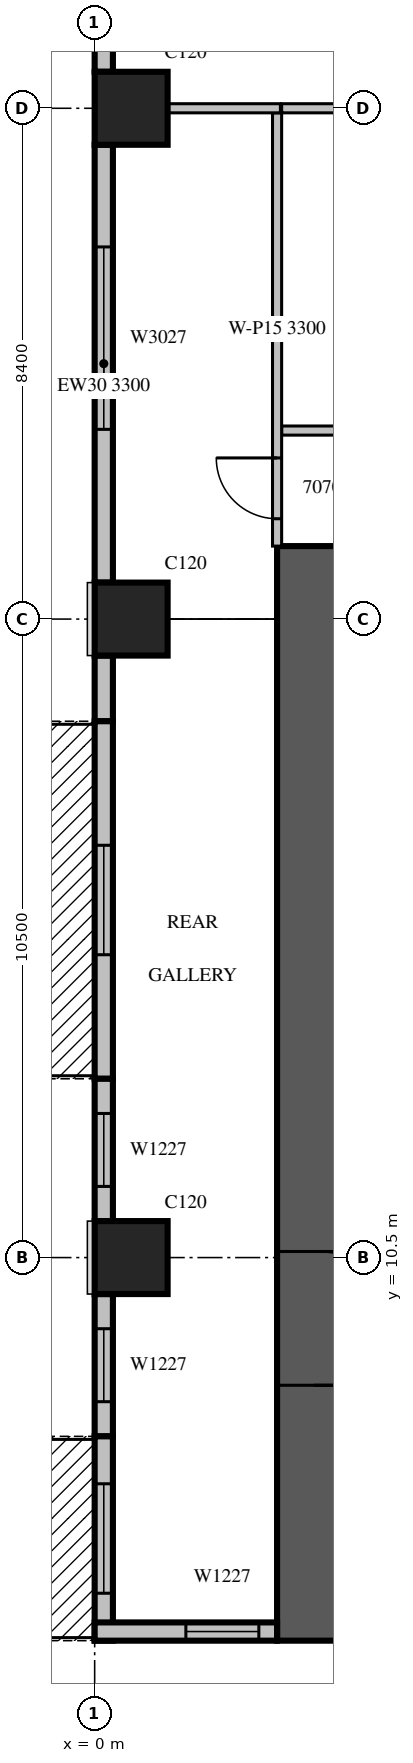
"""IFC4 building model, lengths in metres.
Left out: names, types, materials, properties, quantities, classifications, styles, units other than length and angle.
Written with IfcOpenShell. Run it as: python <this file> out.ifc"""

import sys

from ifc_helpers import new_model, si_unit, direction, frame, frame_2d, origin, origin_2d, place, context, subcontext, project, spatial, rectangle, extrude, source, transform, mapped, element, fill, save


model = new_model("IFC4")
c1 = context("Model", 3, precision=1e-05, world=origin(), true_north=direction((0.0, 1.0)))
c2 = subcontext(c1, "Body", "Model", "MODEL_VIEW")
j1 = project(units=[si_unit("LENGTHUNIT", "METRE"), si_unit("PLANEANGLEUNIT", "RADIAN")], contexts=[c1])
p1 = place(None, origin())
s1 = spatial("IfcSite", under=j1, at=p1, CompositionType="ELEMENT")
p2 = place(p1, origin())
s2 = spatial("IfcBuilding", under=s1, at=p2, CompositionType="ELEMENT")
p3 = place(p2, frame((0.0, 0.0, 40.5)))
s3 = spatial("IfcBuildingStorey", under=s2, at=p3, CompositionType="ELEMENT", Elevation=40.5)
m1 = source(origin(), c2, "Body", "SweptSolid", [
    extrude(rectangle(XDim=1.2, YDim=1.2, at=origin_2d()), origin(), (0.0, 0.0, 1.0), 4.2),
])
for number, where, z_axis, x_axis in (
    (1, (0.6, 10.5, 0.0), (0.0, 0.0, 1.0), (1.0, 0.0, 0.0)),
    (2, (0.6, 21.0, 0.0), (0.0, 0.0, 1.0), (1.0, 0.0, 0.0)),
    (3, (0.6, 29.4, 0.0), (0.0, 0.0, 1.0), (1.0, 0.0, 0.0)),
):
    element("IfcColumn", number, at=place(p3, frame(where, z_axis=z_axis, x_axis=x_axis)), inside=s3, PredefinedType="COLUMN", context=c2, shape_type="MappedRepresentation", body=[
        mapped(m1, transform((0.0, 0.0, 0.0), scale=1.0)),
    ])
p4 = place(p3, frame((3.6, 4.2, 0.0), z_axis=(0.0, 0.0, 1.0), x_axis=(0.0, 1.0, 0.0)))
e4 = element("IfcWall", 4, at=p4, inside=s3, PredefinedType="SHEAR", context=c2, shape_type="SweptSolid", body=[
    extrude(rectangle(XDim=18.0, YDim=1.2, at=frame_2d((9.0, 0.0))), origin(), (0.0, 0.0, 1.0), 4.2),
])
m2 = source(origin(), c2, "Body", "SweptSolid", [
    extrude(rectangle(XDim=2.2, YDim=2.1, at=frame_2d((1.1, 1.05))), frame((0.0, 0.61, 0.0), z_axis=(0.0, -1.0, 0.0), x_axis=(1.0, 0.0, 0.0)), (0.0, 0.0, 1.0), 1.22),
])
p5 = place(p4, frame((4.2, 0.0, 0.0)))
e5 = element("IfcOpeningElement", 5, at=p5, cuts=e4, PredefinedType="OPENING", context=c2, shape_type="MappedRepresentation", body=[
    mapped(m2, transform((0.0, 0.0, 0.0), scale=1.0)),
])
m3 = source(origin(), c2, "Body", "SweptSolid", [
    extrude(rectangle(XDim=7.2, YDim=0.3, at=frame_2d((3.6, 0.0))), origin(), (0.0, 0.0, 1.0), 3.8),
])
p6 = place(p3, frame((0.15, 37.2, 0.0), z_axis=(0.0, 0.0, 1.0), x_axis=(0.0, -1.0, 0.0)))
e6 = element("IfcWall", 6, at=p6, inside=s3, PredefinedType="STANDARD", context=c2, shape_type="MappedRepresentation", body=[
    mapped(m3, transform((0.0, 0.0, 0.0), scale=1.0)),
])
m4 = source(origin(), c2, "Body", "SweptSolid", [
    extrude(rectangle(XDim=1.8, YDim=2.7, at=frame_2d((0.9, 1.35))), frame((0.0, 0.16, 0.0), z_axis=(0.0, -1.0, 0.0), x_axis=(1.0, 0.0, 0.0)), (0.0, 0.0, 1.0), 0.32),
])
p7 = place(p6, frame((0.738, 0.0, 0.6)))
e7 = element("IfcOpeningElement", 7, at=p7, cuts=e6, PredefinedType="OPENING", context=c2, shape_type="MappedRepresentation", body=[
    mapped(m4, transform((0.0, 0.0, 0.0), scale=1.0)),
])
m5 = source(origin(), c2, "Body", "SweptSolid", [
    extrude(rectangle(XDim=2.4, YDim=2.7, at=frame_2d((1.2, 1.35))), frame((0.0, 0.16, 0.0), z_axis=(0.0, -1.0, 0.0), x_axis=(1.0, 0.0, 0.0)), (0.0, 0.0, 1.0), 0.32),
])
p8 = place(p6, frame((3.7, 0.0, 0.6)))
e8 = element("IfcOpeningElement", 8, at=p8, cuts=e6, PredefinedType="OPENING", context=c2, shape_type="MappedRepresentation", body=[
    mapped(m5, transform((0.0, 0.0, 0.0), scale=1.0)),
])
p9 = place(p3, frame((0.15, 28.8, 0.0), z_axis=(0.0, 0.0, 1.0), x_axis=(0.0, -1.0, 0.0)))
e9 = element("IfcWall", 9, at=p9, inside=s3, PredefinedType="STANDARD", context=c2, shape_type="SweptSolid", body=[
    extrude(rectangle(XDim=7.2, YDim=0.3, at=frame_2d((3.6, 0.0))), origin(), (0.0, 0.0, 1.0), 3.3),
])
m6 = source(origin(), c2, "Body", "SweptSolid", [
    extrude(rectangle(XDim=3.0, YDim=2.7, at=frame_2d((1.5, 1.35))), frame((0.0, 0.16, 0.0), z_axis=(0.0, -1.0, 0.0), x_axis=(1.0, 0.0, 0.0)), (0.0, 0.0, 1.0), 0.32),
])
p10 = place(p9, frame((1.68, 0.0, 0.6)))
e10 = element("IfcOpeningElement", 10, at=p10, cuts=e9, PredefinedType="OPENING", context=c2, shape_type="MappedRepresentation", body=[
    mapped(m6, transform((0.0, 0.0, 0.0), scale=1.0)),
])
p11 = place(p3, frame((0.15, 20.4, 0.0), z_axis=(0.0, 0.0, 1.0), x_axis=(0.0, -1.0, 0.0)))
e11 = element("IfcWall", 11, at=p11, inside=s3, PredefinedType="STANDARD", context=c2, shape_type="SweptSolid", body=[
    extrude(rectangle(XDim=1.08, YDim=0.3, at=frame_2d((0.54, 0.0))), origin(), (0.0, 0.0, 1.0), 3.8),
])
m7 = source(origin(), c2, "Body", "SweptSolid", [
    extrude(rectangle(XDim=5.88, YDim=0.3, at=frame_2d((2.94, 0.0))), origin(), (0.0, 0.0, 1.0), 3.8),
])
p12 = place(p3, frame((0.15, 19.32, 0.0), z_axis=(0.0, 0.0, 1.0), x_axis=(0.0, -1.0, 0.0)))
e12 = element("IfcWall", 12, at=p12, inside=s3, PredefinedType="STANDARD", context=c2, shape_type="MappedRepresentation", body=[
    mapped(m7, transform((0.0, 0.0, 0.0), scale=1.0)),
])
m8 = source(origin(), c2, "Body", "SweptSolid", [
    extrude(rectangle(XDim=1.8, YDim=2.4, at=frame_2d((0.9, 1.2))), frame((0.0, 0.16, 0.0), z_axis=(0.0, -1.0, 0.0), x_axis=(1.0, 0.0, 0.0)), (0.0, 0.0, 1.0), 0.32),
])
p13 = place(p12, frame((2.04, 0.0, 0.0)))
e13 = element("IfcOpeningElement", 13, at=p13, cuts=e12, PredefinedType="OPENING", context=c2, shape_type="MappedRepresentation", body=[
    mapped(m8, transform((0.0, 0.0, 0.0), scale=1.0)),
])
p14 = place(p3, frame((0.15, 13.44, 0.0), z_axis=(0.0, 0.0, 1.0), x_axis=(0.0, -1.0, 0.0)))
e14 = element("IfcWall", 14, at=p14, inside=s3, PredefinedType="STANDARD", context=c2, shape_type="SweptSolid", body=[
    extrude(rectangle(XDim=2.34, YDim=0.3, at=frame_2d((1.17, 0.0))), origin(), (0.0, 0.0, 1.0), 3.8),
])
m9 = source(origin(), c2, "Body", "SweptSolid", [
    extrude(rectangle(XDim=1.2, YDim=2.7, at=frame_2d((0.6, 1.35))), frame((0.0, 0.16, 0.0), z_axis=(0.0, -1.0, 0.0), x_axis=(1.0, 0.0, 0.0)), (0.0, 0.0, 1.0), 0.32),
])
p15 = place(p14, frame((0.57, 0.0, 0.6)))
e15 = element("IfcOpeningElement", 15, at=p15, cuts=e14, PredefinedType="OPENING", context=c2, shape_type="MappedRepresentation", body=[
    mapped(m9, transform((0.0, 0.0, 0.0), scale=1.0)),
])
m10 = source(origin(), c2, "Body", "SweptSolid", [
    extrude(rectangle(XDim=2.34, YDim=0.3, at=frame_2d((1.17, 0.0))), origin(), (0.0, 0.0, 1.0), 3.8),
])
p16 = place(p3, frame((0.15, 9.9, 0.0), z_axis=(0.0, 0.0, 1.0), x_axis=(0.0, -1.0, 0.0)))
e16 = element("IfcWall", 16, at=p16, inside=s3, PredefinedType="STANDARD", context=c2, shape_type="MappedRepresentation", body=[
    mapped(m10, transform((0.0, 0.0, 0.0), scale=1.0)),
])
p17 = place(p16, frame((0.57, 0.0, 0.6)))
e17 = element("IfcOpeningElement", 17, at=p17, cuts=e16, PredefinedType="OPENING", context=c2, shape_type="MappedRepresentation", body=[
    mapped(m9, transform((0.0, 0.0, 0.0), scale=1.0)),
])
p18 = place(p3, frame((0.15, 7.56, 0.0), z_axis=(0.0, 0.0, 1.0), x_axis=(0.0, -1.0, 0.0)))
e18 = element("IfcWall", 18, at=p18, inside=s3, PredefinedType="STANDARD", context=c2, shape_type="SweptSolid", body=[
    extrude(rectangle(XDim=3.36, YDim=0.3, at=frame_2d((1.68, 0.0))), origin(), (0.0, 0.0, 1.0), 3.8),
])
p19 = place(p18, frame((0.78, 0.0, 0.0)))
e19 = element("IfcOpeningElement", 19, at=p19, cuts=e18, PredefinedType="OPENING", context=c2, shape_type="MappedRepresentation", body=[
    mapped(m8, transform((0.0, 0.0, 0.0), scale=1.0)),
])
m11 = source(origin(), c2, "Body", "SweptSolid", [
    extrude(rectangle(XDim=3.0, YDim=0.3, at=frame_2d((1.5, 0.0))), origin(), (0.0, 0.0, 1.0), 3.8),
])
p20 = place(p3, frame((0.0, 4.35, 0.0), z_axis=(0.0, 0.0, 1.0), x_axis=(1.0, 0.0, 0.0)))
e20 = element("IfcWall", 20, at=p20, inside=s3, PredefinedType="STANDARD", context=c2, shape_type="MappedRepresentation", body=[
    mapped(m11, transform((0.0, 0.0, 0.0), scale=1.0)),
])
p21 = place(p20, frame((1.5, 0.0, 0.6)))
e21 = element("IfcOpeningElement", 21, at=p21, cuts=e20, PredefinedType="OPENING", context=c2, shape_type="MappedRepresentation", body=[
    mapped(m9, transform((0.0, 0.0, 0.0), scale=1.0)),
])
p22 = place(p3, frame((3.075, 24.1, 0.0), z_axis=(0.0, 0.0, 1.0), x_axis=(1.0, 0.0, 0.0)))
e22 = element("IfcWall", 22, at=p22, inside=s3, PredefinedType="PARTITIONING", context=c2, shape_type="SweptSolid", body=[
    extrude(rectangle(XDim=11.925, YDim=0.15, at=frame_2d((5.963, 0.0))), origin(), (0.0, 0.0, 1.0), 2.8),
])
m12 = source(origin(), c2, "Body", "SweptSolid", [
    extrude(rectangle(XDim=0.9, YDim=2.1, at=frame_2d((0.45, 1.05))), frame((0.0, 0.085, 0.0), z_axis=(0.0, -1.0, 0.0), x_axis=(1.0, 0.0, 0.0)), (0.0, 0.0, 1.0), 0.17),
])
p23 = place(p22, frame((2.663, 0.0, 0.0)))
e23 = element("IfcOpeningElement", 23, at=p23, cuts=e22, PredefinedType="OPENING", context=c2, shape_type="MappedRepresentation", body=[
    mapped(m12, transform((0.0, 0.0, 0.0), scale=1.0)),
])
p24 = place(p22, frame((9.5, 0.0, 0.0)))
e24 = element("IfcOpeningElement", 24, at=p24, cuts=e22, PredefinedType="OPENING", context=c2, shape_type="MappedRepresentation", body=[
    mapped(m12, transform((0.0, 0.0, 0.0), scale=1.0)),
])
m13 = source(origin(), c2, "Body", "SweptSolid", [
    extrude(rectangle(XDim=6.826, YDim=0.15, at=frame_2d((3.413, 0.0))), origin(), (0.0, 0.0, 1.0), 3.8),
])
p25 = place(p3, frame((9.901, 29.4, 0.0), z_axis=(0.0, 0.0, 1.0), x_axis=(-1.0, 0.0, 0.0)))
e25 = element("IfcWall", 25, at=p25, inside=s3, PredefinedType="PARTITIONING", context=c2, shape_type="MappedRepresentation", body=[
    mapped(m13, transform((0.0, 0.0, 0.0), scale=1.0)),
])
p26 = place(p3, frame((3.0, 29.325, 0.0), z_axis=(0.0, 0.0, 1.0), x_axis=(0.0, -1.0, 0.0)))
e26 = element("IfcWall", 26, at=p26, inside=s3, PredefinedType="PARTITIONING", context=c2, shape_type="SweptSolid", body=[
    extrude(rectangle(XDim=7.125, YDim=0.15, at=frame_2d((3.562, 0.0))), origin(), (0.0, 0.0, 1.0), 3.3),
])
m14 = source(origin(), c2, "Body", "SweptSolid", [
    extrude(rectangle(XDim=1.0, YDim=2.1, at=frame_2d((0.5, 1.05))), frame((0.0, 0.085, 0.0), z_axis=(0.0, -1.0, 0.0), x_axis=(1.0, 0.0, 0.0)), (0.0, 0.0, 1.0), 0.17),
])
p27 = place(p26, frame((5.675, 0.0, 0.0)))
e27 = element("IfcOpeningElement", 27, at=p27, cuts=e26, PredefinedType="OPENING", context=c2, shape_type="MappedRepresentation", body=[
    mapped(m14, transform((0.0, 0.0, 0.0), scale=1.0)),
])
m15 = source(origin(), c2, "Body", "SweptSolid", [
    extrude(rectangle(XDim=1.856, YDim=0.15, at=frame_2d((0.928, 0.0))), origin(), (0.0, 0.0, 1.0), 3.8),
])
p28 = place(p3, frame((3.055, 29.4, 0.0), z_axis=(0.0, 0.0, 1.0), x_axis=(-1.0, 0.0, 0.0)))
e28 = element("IfcWall", 28, at=p28, inside=s3, PredefinedType="PARTITIONING", context=c2, shape_type="MappedRepresentation", body=[
    mapped(m15, transform((0.0, 0.0, 0.0), scale=1.0)),
])
m16 = source(origin(), c2, "Body", "SweptSolid", [
    extrude(rectangle(XDim=3.0, YDim=2.7, at=frame_2d((1.5, 1.35))), frame((0.0, 0.03, 0.0), z_axis=(0.0, -1.0, 0.0), x_axis=(1.0, 0.0, 0.0)), (0.0, 0.0, 1.0), 0.06),
])
p29 = place(p10, origin())
e29 = element("IfcWindow", 29, at=p29, inside=s3, PartitioningType="SINGLE_PANEL", PredefinedType="WINDOW", context=c2, shape_type="MappedRepresentation", body=[
    mapped(m16, transform((0.0, 0.0, 0.0), scale=1.0)),
])
fill(e10, e29)
m17 = source(origin(), c2, "Body", "SweptSolid", [
    extrude(rectangle(XDim=1.8, YDim=2.4, at=frame_2d((0.9, 1.2))), frame((0.0, 0.025, 0.0), z_axis=(0.0, -1.0, 0.0), x_axis=(1.0, 0.0, 0.0)), (0.0, 0.0, 1.0), 0.05),
])
p30 = place(p13, origin())
e30 = element("IfcDoor", 30, at=p30, inside=s3, OperationType="SLIDING_TO_LEFT", PredefinedType="DOOR", context=c2, shape_type="MappedRepresentation", body=[
    mapped(m17, transform((0.0, 0.0, 0.0), scale=1.0)),
])
fill(e13, e30)
m18 = source(origin(), c2, "Body", "SweptSolid", [
    extrude(rectangle(XDim=1.2, YDim=2.7, at=frame_2d((0.6, 1.35))), frame((0.0, 0.03, 0.0), z_axis=(0.0, -1.0, 0.0), x_axis=(1.0, 0.0, 0.0)), (0.0, 0.0, 1.0), 0.06),
])
p31 = place(p15, origin())
e31 = element("IfcWindow", 31, at=p31, inside=s3, PartitioningType="SINGLE_PANEL", PredefinedType="WINDOW", context=c2, shape_type="MappedRepresentation", body=[
    mapped(m18, transform((0.0, 0.0, 0.0), scale=1.0)),
])
fill(e15, e31)
p32 = place(p17, origin())
e32 = element("IfcWindow", 32, at=p32, inside=s3, PartitioningType="SINGLE_PANEL", PredefinedType="WINDOW", context=c2, shape_type="MappedRepresentation", body=[
    mapped(m18, transform((0.0, 0.0, 0.0), scale=1.0)),
])
fill(e17, e32)
p33 = place(p19, origin())
e33 = element("IfcDoor", 33, at=p33, inside=s3, OperationType="SLIDING_TO_LEFT", PredefinedType="DOOR", context=c2, shape_type="MappedRepresentation", body=[
    mapped(m17, transform((0.0, 0.0, 0.0), scale=1.0)),
])
fill(e19, e33)
p34 = place(p21, origin())
e34 = element("IfcWindow", 34, at=p34, inside=s3, PartitioningType="SINGLE_PANEL", PredefinedType="WINDOW", context=c2, shape_type="MappedRepresentation", body=[
    mapped(m18, transform((0.0, 0.0, 0.0), scale=1.0)),
])
fill(e21, e34)
m19 = source(origin(), c2, "Body", "SweptSolid", [
    extrude(rectangle(XDim=2.2, YDim=2.1, at=frame_2d((1.1, 1.05))), frame((0.0, 0.025, 0.0), z_axis=(0.0, -1.0, 0.0), x_axis=(1.0, 0.0, 0.0)), (0.0, 0.0, 1.0), 0.05),
])
p35 = place(p5, origin())
e35 = element("IfcDoor", 35, at=p35, inside=s3, OperationType="DOUBLE_DOOR_SINGLE_SWING", PredefinedType="DOOR", context=c2, shape_type="MappedRepresentation", body=[
    mapped(m19, transform((0.0, 0.0, 0.0), scale=1.0)),
])
fill(e5, e35)
m20 = source(origin(), c2, "Body", "SweptSolid", [
    extrude(rectangle(XDim=1.0, YDim=2.1, at=frame_2d((0.5, 1.05))), frame((0.0, 0.025, 0.0), z_axis=(0.0, -1.0, 0.0), x_axis=(1.0, 0.0, 0.0)), (0.0, 0.0, 1.0), 0.05),
])
p36 = place(p27, origin())
e36 = element("IfcDoor", 36, at=p36, inside=s3, OperationType="SINGLE_SWING_RIGHT", PredefinedType="DOOR", context=c2, shape_type="MappedRepresentation", body=[
    mapped(m20, transform((0.0, 0.0, 0.0), scale=1.0)),
])
fill(e27, e36)
save(model, sys.argv[1])
